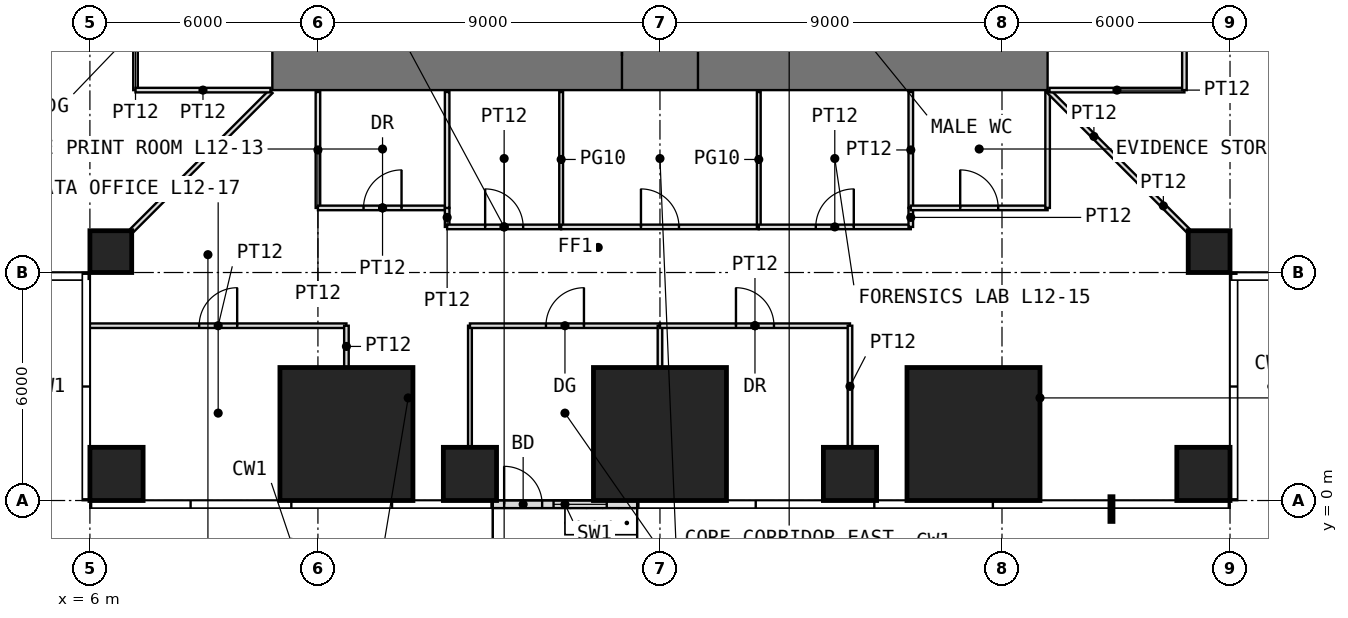
"""IFC4 building model, lengths in metres.
Left out: names, types, materials, properties, quantities, classifications, styles, units other than length and angle.
Written with IfcOpenShell. Run it as: python <this file> out.ifc"""

import sys

from ifc_helpers import new_model, si_unit, direction, frame, frame_2d, origin, origin_2d, place, context, subcontext, project, spatial, rectangle, extrude, element, fill, save


model = new_model("IFC4")
c1 = context("Model", 3, precision=1e-05, world=origin(), true_north=direction((0.0, 1.0)))
c2 = subcontext(c1, "Body", "Model", "MODEL_VIEW")
j1 = project(units=[si_unit("LENGTHUNIT", "METRE"), si_unit("PLANEANGLEUNIT", "RADIAN")], contexts=[c1])
p1 = place(None, origin())
s1 = spatial("IfcSite", under=j1, at=p1, CompositionType="ELEMENT")
p2 = place(p1, origin())
s2 = spatial("IfcBuilding", under=s1, at=p2, CompositionType="ELEMENT")
p3 = place(p2, frame((0.0, 0.0, 54.5)))
s3 = spatial("IfcBuildingStorey", under=s2, at=p3, CompositionType="ELEMENT", Elevation=54.5)
p4 = place(p3, frame((6.7, 0.7, 0.0), z_axis=(0.0, 0.0, 1.0), x_axis=(1.0, 0.0, 0.0)))
e1 = element("IfcColumn", 1, at=p4, inside=s3, PredefinedType="COLUMN", context=c2, shape_type="SweptSolid", body=[
    extrude(rectangle(XDim=1.4, YDim=1.4, at=origin_2d()), origin(), (0.0, 0.0, 1.0), 4.0),
])
p5 = place(p3, frame((12.75, 1.75, 0.0), z_axis=(0.0, 0.0, 1.0), x_axis=(1.0, 0.0, 0.0)))
e2 = element("IfcColumn", 2, at=p5, inside=s3, PredefinedType="COLUMN", context=c2, shape_type="SweptSolid", body=[
    extrude(rectangle(XDim=3.5, YDim=3.5, at=origin_2d()), origin(), (0.0, 0.0, 1.0), 4.0),
])
p6 = place(p3, frame((16.0, 0.7, 0.0), z_axis=(0.0, 0.0, 1.0), x_axis=(1.0, 0.0, 0.0)))
e3 = element("IfcColumn", 3, at=p6, inside=s3, PredefinedType="COLUMN", context=c2, shape_type="SweptSolid", body=[
    extrude(rectangle(XDim=1.4, YDim=1.4, at=origin_2d()), origin(), (0.0, 0.0, 1.0), 4.0),
])
p7 = place(p3, frame((21.0, 1.75, 0.0), z_axis=(0.0, 0.0, 1.0), x_axis=(1.0, 0.0, 0.0)))
e4 = element("IfcColumn", 4, at=p7, inside=s3, PredefinedType="COLUMN", context=c2, shape_type="SweptSolid", body=[
    extrude(rectangle(XDim=3.5, YDim=3.5, at=origin_2d()), origin(), (0.0, 0.0, 1.0), 4.0),
])
p8 = place(p3, frame((26.0, 0.7, 0.0), z_axis=(0.0, 0.0, 1.0), x_axis=(1.0, 0.0, 0.0)))
e5 = element("IfcColumn", 5, at=p8, inside=s3, PredefinedType="COLUMN", context=c2, shape_type="SweptSolid", body=[
    extrude(rectangle(XDim=1.4, YDim=1.4, at=origin_2d()), origin(), (0.0, 0.0, 1.0), 4.0),
])
p9 = place(p3, frame((29.25, 1.75, 0.0), z_axis=(0.0, 0.0, 1.0), x_axis=(1.0, 0.0, 0.0)))
e6 = element("IfcColumn", 6, at=p9, inside=s3, PredefinedType="COLUMN", context=c2, shape_type="SweptSolid", body=[
    extrude(rectangle(XDim=3.5, YDim=3.5, at=origin_2d()), origin(), (0.0, 0.0, 1.0), 4.0),
])
p10 = place(p3, frame((35.3, 0.7, 0.0), z_axis=(0.0, 0.0, 1.0), x_axis=(1.0, 0.0, 0.0)))
e7 = element("IfcColumn", 7, at=p10, inside=s3, PredefinedType="COLUMN", context=c2, shape_type="SweptSolid", body=[
    extrude(rectangle(XDim=1.4, YDim=1.4, at=origin_2d()), origin(), (0.0, 0.0, 1.0), 4.0),
])
for number, where, z_axis, x_axis in (
    (8, (6.55, 6.55, 0.0), (0.0, 0.0, 1.0), (1.0, 0.0, 0.0)),
    (9, (35.45, 6.55, 0.0), (0.0, 0.0, 1.0), (1.0, 0.0, 0.0)),
):
    element("IfcColumn", number, at=place(p3, frame(where, z_axis=z_axis, x_axis=x_axis)), inside=s3, PredefinedType="COLUMN", context=c2, shape_type="SweptSolid", body=[
        extrude(rectangle(XDim=1.1, YDim=1.1, at=origin_2d()), origin(), (0.0, 0.0, 1.0), 4.0),
    ])
p11 = place(p3, frame((16.6, -0.1, 0.0), z_axis=(0.0, 0.0, 1.0), x_axis=(1.0, 0.0, 0.0)))
e10 = element("IfcWall", 10, at=p11, inside=s3, PredefinedType="USERDEFINED", context=c2, shape_type="SweptSolid", body=[
    extrude(rectangle(XDim=3.8, YDim=0.2, at=frame_2d((1.9, 0.0))), origin(), (0.0, 0.0, 1.0), 3.75),
])
p12 = place(p11, frame((0.3, 0.0, 0.0)))
e11 = element("IfcOpeningElement", 11, at=p12, cuts=e10, PredefinedType="OPENING", context=c2, shape_type="SweptSolid", body=[
    extrude(rectangle(XDim=1.0, YDim=2.4, at=frame_2d((0.5, 1.2))), frame((0.0, 0.11, 0.0), z_axis=(0.0, -1.0, 0.0), x_axis=(1.0, 0.0, 0.0)), (0.0, 0.0, 1.0), 0.22),
])
p13 = place(p11, frame((1.6, 0.0, 0.3)))
e12 = element("IfcOpeningElement", 12, at=p13, cuts=e10, PredefinedType="OPENING", context=c2, shape_type="SweptSolid", body=[
    extrude(rectangle(XDim=1.4, YDim=2.7, at=frame_2d((0.7, 1.35))), frame((0.0, 0.11, 0.0), z_axis=(0.0, -1.0, 0.0), x_axis=(1.0, 0.0, 0.0)), (0.0, 0.0, 1.0), 0.22),
])
p14 = place(p3, frame((10.8, 11.7, -0.05), z_axis=(0.0, 0.0, 1.0), x_axis=(1.0, 0.0, 0.0)))
e13 = element("IfcWall", 13, at=p14, inside=s3, PredefinedType="SHEAR", context=c2, shape_type="SweptSolid", body=[
    extrude(rectangle(XDim=20.4, YDim=1.8, at=frame_2d((10.2, 0.0))), origin(), (0.0, 0.0, 1.0), 4.0),
])
p15 = place(p14, frame((9.2, 0.0, 0.05)))
e14 = element("IfcOpeningElement", 14, at=p15, cuts=e13, PredefinedType="OPENING", context=c2, shape_type="SweptSolid", body=[
    extrude(rectangle(XDim=2.0, YDim=2.2, at=frame_2d((1.0, 1.1))), frame((0.0, 0.91, 0.0), z_axis=(0.0, -1.0, 0.0), x_axis=(1.0, 0.0, 0.0)), (0.0, 0.0, 1.0), 1.82),
])
p16 = place(p3, frame((6.0, 4.6, 0.0), z_axis=(0.0, 0.0, 1.0), x_axis=(1.0, 0.0, 0.0)))
e15 = element("IfcWall", 15, at=p16, inside=s3, PredefinedType="PARTITIONING", context=c2, shape_type="SweptSolid", body=[
    extrude(rectangle(XDim=6.75, YDim=0.12, at=frame_2d((3.375, 0.0))), origin(), (0.0, 0.0, 1.0), 3.75),
])
p17 = place(p16, frame((2.875, 0.0, 0.0)))
e16 = element("IfcOpeningElement", 16, at=p17, cuts=e15, PredefinedType="OPENING", context=c2, shape_type="SweptSolid", body=[
    extrude(rectangle(XDim=1.0, YDim=2.2, at=frame_2d((0.5, 1.1))), frame((0.0, 0.07, 0.0), z_axis=(0.0, -1.0, 0.0), x_axis=(1.0, 0.0, 0.0)), (0.0, 0.0, 1.0), 0.14),
])
p18 = place(p3, frame((7.11, 7.11, 0.0), z_axis=(0.0, 0.0, 1.0), x_axis=(0.707106781187, 0.707106781187, 0.0)))
e17 = element("IfcWall", 17, at=p18, inside=s3, PredefinedType="PARTITIONING", context=c2, shape_type="SweptSolid", body=[
    extrude(rectangle(XDim=5.168, YDim=0.12, at=frame_2d((2.584, 0.0))), origin(), (0.0, 0.0, 1.0), 3.75),
])
p19 = place(p3, frame((7.2, 10.8, 0.0), z_axis=(0.0, 0.0, 1.0), x_axis=(0.0, 1.0, 0.0)))
e18 = element("IfcWall", 18, at=p19, inside=s3, PredefinedType="PARTITIONING", context=c2, shape_type="SweptSolid", body=[
    extrude(rectangle(XDim=3.2, YDim=0.12, at=frame_2d((1.6, 0.0))), origin(), (0.0, 0.0, 1.0), 3.75),
])
p20 = place(p19, frame((1.1, 0.0, 0.0)))
e19 = element("IfcOpeningElement", 19, at=p20, cuts=e18, PredefinedType="OPENING", context=c2, shape_type="SweptSolid", body=[
    extrude(rectangle(XDim=1.0, YDim=2.4, at=frame_2d((0.5, 1.2))), frame((0.0, 0.07, 0.0), z_axis=(0.0, -1.0, 0.0), x_axis=(1.0, 0.0, 0.0)), (0.0, 0.0, 1.0), 0.14),
])
p21 = place(p3, frame((7.2, 10.8, 0.0), z_axis=(0.0, 0.0, 1.0), x_axis=(1.0, 0.0, 0.0)))
e20 = element("IfcWall", 20, at=p21, inside=s3, PredefinedType="PARTITIONING", context=c2, shape_type="SweptSolid", body=[
    extrude(rectangle(XDim=3.55, YDim=0.12, at=frame_2d((1.775, 0.0))), origin(), (0.0, 0.0, 1.0), 3.75),
])
p22 = place(p3, frame((12.0, 7.7, 0.0), z_axis=(0.0, 0.0, 1.0), x_axis=(0.0, 1.0, 0.0)))
e21 = element("IfcWall", 21, at=p22, inside=s3, PredefinedType="PARTITIONING", context=c2, shape_type="SweptSolid", body=[
    extrude(rectangle(XDim=3.05, YDim=0.12, at=frame_2d((1.525, 0.0))), origin(), (0.0, 0.0, 1.0), 3.75),
])
p23 = place(p3, frame((12.0, 7.7, 0.0), z_axis=(0.0, 0.0, 1.0), x_axis=(1.0, 0.0, 0.0)))
e22 = element("IfcWall", 22, at=p23, inside=s3, PredefinedType="PARTITIONING", context=c2, shape_type="SweptSolid", body=[
    extrude(rectangle(XDim=3.4, YDim=0.12, at=frame_2d((1.7, 0.0))), origin(), (0.0, 0.0, 1.0), 3.75),
])
p24 = place(p23, frame((1.2, 0.0, 0.0)))
e23 = element("IfcOpeningElement", 23, at=p24, cuts=e22, PredefinedType="OPENING", context=c2, shape_type="SweptSolid", body=[
    extrude(rectangle(XDim=1.0, YDim=2.2, at=frame_2d((0.5, 1.1))), frame((0.0, 0.07, 0.0), z_axis=(0.0, -1.0, 0.0), x_axis=(1.0, 0.0, 0.0)), (0.0, 0.0, 1.0), 0.14),
])
p25 = place(p3, frame((12.75, 3.51, 0.0), z_axis=(0.0, 0.0, 1.0), x_axis=(0.0, 1.0, 0.0)))
e24 = element("IfcWall", 24, at=p25, inside=s3, PredefinedType="PARTITIONING", context=c2, shape_type="SweptSolid", body=[
    extrude(rectangle(XDim=1.09, YDim=0.12, at=frame_2d((0.545, 0.0))), origin(), (0.0, 0.0, 1.0), 3.75),
])
p26 = place(p3, frame((15.4, 7.2, 0.0), z_axis=(0.0, 0.0, 1.0), x_axis=(0.0, 1.0, 0.0)))
e25 = element("IfcWall", 25, at=p26, inside=s3, PredefinedType="PARTITIONING", context=c2, shape_type="SweptSolid", body=[
    extrude(rectangle(XDim=0.5, YDim=0.12, at=frame_2d((0.25, 0.0))), origin(), (0.0, 0.0, 1.0), 3.75),
])
p27 = place(p3, frame((15.4, 7.2, 0.0), z_axis=(0.0, 0.0, 1.0), x_axis=(1.0, 0.0, 0.0)))
e26 = element("IfcWall", 26, at=p27, inside=s3, PredefinedType="PARTITIONING", context=c2, shape_type="SweptSolid", body=[
    extrude(rectangle(XDim=3.0, YDim=0.12, at=frame_2d((1.5, 0.0))), origin(), (0.0, 0.0, 1.0), 3.75),
])
p28 = place(p27, frame((1.0, 0.0, 0.0)))
e27 = element("IfcOpeningElement", 27, at=p28, cuts=e26, PredefinedType="OPENING", context=c2, shape_type="SweptSolid", body=[
    extrude(rectangle(XDim=1.0, YDim=2.4, at=frame_2d((0.5, 1.2))), frame((0.0, 0.07, 0.0), z_axis=(0.0, -1.0, 0.0), x_axis=(1.0, 0.0, 0.0)), (0.0, 0.0, 1.0), 0.14),
])
p29 = place(p3, frame((15.4, 7.7, 0.0), z_axis=(0.0, 0.0, 1.0), x_axis=(0.0, 1.0, 0.0)))
e28 = element("IfcWall", 28, at=p29, inside=s3, PredefinedType="PARTITIONING", context=c2, shape_type="SweptSolid", body=[
    extrude(rectangle(XDim=3.05, YDim=0.12, at=frame_2d((1.525, 0.0))), origin(), (0.0, 0.0, 1.0), 3.75),
])
p30 = place(p3, frame((16.0, 1.41, 0.0), z_axis=(0.0, 0.0, 1.0), x_axis=(0.0, 1.0, 0.0)))
e29 = element("IfcWall", 29, at=p30, inside=s3, PredefinedType="PARTITIONING", context=c2, shape_type="SweptSolid", body=[
    extrude(rectangle(XDim=3.19, YDim=0.1, at=frame_2d((1.595, 0.0))), origin(), (0.0, 0.0, 1.0), 3.75),
])
p31 = place(p3, frame((16.0, 4.6, 0.0), z_axis=(0.0, 0.0, 1.0), x_axis=(1.0, 0.0, 0.0)))
e30 = element("IfcWall", 30, at=p31, inside=s3, PredefinedType="PARTITIONING", context=c2, shape_type="SweptSolid", body=[
    extrude(rectangle(XDim=5.0, YDim=0.12, at=frame_2d((2.5, 0.0))), origin(), (0.0, 0.0, 1.0), 3.75),
])
p32 = place(p31, frame((2.0, 0.0, 0.0)))
e31 = element("IfcOpeningElement", 31, at=p32, cuts=e30, PredefinedType="OPENING", context=c2, shape_type="SweptSolid", body=[
    extrude(rectangle(XDim=1.0, YDim=2.4, at=frame_2d((0.5, 1.2))), frame((0.0, 0.07, 0.0), z_axis=(0.0, -1.0, 0.0), x_axis=(1.0, 0.0, 0.0)), (0.0, 0.0, 1.0), 0.14),
])
p33 = place(p3, frame((18.4, 7.2, 0.0), z_axis=(0.0, 0.0, 1.0), x_axis=(0.0, 1.0, 0.0)))
e32 = element("IfcWall", 32, at=p33, inside=s3, PredefinedType="PARTITIONING", context=c2, shape_type="SweptSolid", body=[
    extrude(rectangle(XDim=3.55, YDim=0.1, at=frame_2d((1.775, 0.0))), origin(), (0.0, 0.0, 1.0), 3.75),
])
p34 = place(p3, frame((18.4, 7.2, 0.0), z_axis=(0.0, 0.0, 1.0), x_axis=(1.0, 0.0, 0.0)))
e33 = element("IfcWall", 33, at=p34, inside=s3, PredefinedType="PARTITIONING", context=c2, shape_type="SweptSolid", body=[
    extrude(rectangle(XDim=5.2, YDim=0.12, at=frame_2d((2.6, 0.0))), origin(), (0.0, 0.0, 1.0), 3.75),
])
p35 = place(p34, frame((2.1, 0.0, 0.0)))
e34 = element("IfcOpeningElement", 34, at=p35, cuts=e33, PredefinedType="OPENING", context=c2, shape_type="SweptSolid", body=[
    extrude(rectangle(XDim=1.0, YDim=2.4, at=frame_2d((0.5, 1.2))), frame((0.0, 0.07, 0.0), z_axis=(0.0, -1.0, 0.0), x_axis=(1.0, 0.0, 0.0)), (0.0, 0.0, 1.0), 0.14),
])
p36 = place(p3, frame((21.0, 3.51, 0.0), z_axis=(0.0, 0.0, 1.0), x_axis=(0.0, 1.0, 0.0)))
e35 = element("IfcWall", 35, at=p36, inside=s3, PredefinedType="PARTITIONING", context=c2, shape_type="SweptSolid", body=[
    extrude(rectangle(XDim=1.09, YDim=0.12, at=frame_2d((0.545, 0.0))), origin(), (0.0, 0.0, 1.0), 3.75),
])
p37 = place(p3, frame((21.0, 4.6, 0.0), z_axis=(0.0, 0.0, 1.0), x_axis=(1.0, 0.0, 0.0)))
e36 = element("IfcWall", 36, at=p37, inside=s3, PredefinedType="PARTITIONING", context=c2, shape_type="SweptSolid", body=[
    extrude(rectangle(XDim=5.0, YDim=0.12, at=frame_2d((2.5, 0.0))), origin(), (0.0, 0.0, 1.0), 3.75),
])
p38 = place(p37, frame((2.0, 0.0, 0.0)))
e37 = element("IfcOpeningElement", 37, at=p38, cuts=e36, PredefinedType="OPENING", context=c2, shape_type="SweptSolid", body=[
    extrude(rectangle(XDim=1.0, YDim=2.2, at=frame_2d((0.5, 1.1))), frame((0.0, 0.07, 0.0), z_axis=(0.0, -1.0, 0.0), x_axis=(1.0, 0.0, 0.0)), (0.0, 0.0, 1.0), 0.14),
])
p39 = place(p3, frame((23.6, 7.2, 0.0), z_axis=(0.0, 0.0, 1.0), x_axis=(0.0, 1.0, 0.0)))
e38 = element("IfcWall", 38, at=p39, inside=s3, PredefinedType="PARTITIONING", context=c2, shape_type="SweptSolid", body=[
    extrude(rectangle(XDim=3.55, YDim=0.1, at=frame_2d((1.775, 0.0))), origin(), (0.0, 0.0, 1.0), 3.75),
])
p40 = place(p3, frame((23.6, 7.2, 0.0), z_axis=(0.0, 0.0, 1.0), x_axis=(1.0, 0.0, 0.0)))
e39 = element("IfcWall", 39, at=p40, inside=s3, PredefinedType="PARTITIONING", context=c2, shape_type="SweptSolid", body=[
    extrude(rectangle(XDim=4.0, YDim=0.12, at=frame_2d((2.0, 0.0))), origin(), (0.0, 0.0, 1.0), 3.75),
])
p41 = place(p40, frame((1.5, 0.0, 0.0)))
e40 = element("IfcOpeningElement", 40, at=p41, cuts=e39, PredefinedType="OPENING", context=c2, shape_type="SweptSolid", body=[
    extrude(rectangle(XDim=1.0, YDim=2.4, at=frame_2d((0.5, 1.2))), frame((0.0, 0.07, 0.0), z_axis=(0.0, -1.0, 0.0), x_axis=(1.0, 0.0, 0.0)), (0.0, 0.0, 1.0), 0.14),
])
p42 = place(p3, frame((26.0, 1.41, 0.0), z_axis=(0.0, 0.0, 1.0), x_axis=(0.0, 1.0, 0.0)))
e41 = element("IfcWall", 41, at=p42, inside=s3, PredefinedType="PARTITIONING", context=c2, shape_type="SweptSolid", body=[
    extrude(rectangle(XDim=3.19, YDim=0.12, at=frame_2d((1.595, 0.0))), origin(), (0.0, 0.0, 1.0), 3.75),
])
p43 = place(p3, frame((27.6, 7.2, 0.0), z_axis=(0.0, 0.0, 1.0), x_axis=(0.0, 1.0, 0.0)))
e42 = element("IfcWall", 42, at=p43, inside=s3, PredefinedType="PARTITIONING", context=c2, shape_type="SweptSolid", body=[
    extrude(rectangle(XDim=0.5, YDim=0.12, at=frame_2d((0.25, 0.0))), origin(), (0.0, 0.0, 1.0), 3.75),
])
p44 = place(p3, frame((27.6, 7.7, 0.0), z_axis=(0.0, 0.0, 1.0), x_axis=(0.0, 1.0, 0.0)))
e43 = element("IfcWall", 43, at=p44, inside=s3, PredefinedType="PARTITIONING", context=c2, shape_type="SweptSolid", body=[
    extrude(rectangle(XDim=3.05, YDim=0.12, at=frame_2d((1.525, 0.0))), origin(), (0.0, 0.0, 1.0), 3.75),
])
p45 = place(p3, frame((27.6, 7.7, 0.0), z_axis=(0.0, 0.0, 1.0), x_axis=(1.0, 0.0, 0.0)))
e44 = element("IfcWall", 44, at=p45, inside=s3, PredefinedType="PARTITIONING", context=c2, shape_type="SweptSolid", body=[
    extrude(rectangle(XDim=3.6, YDim=0.12, at=frame_2d((1.8, 0.0))), origin(), (0.0, 0.0, 1.0), 3.75),
])
p46 = place(p45, frame((1.3, 0.0, 0.0)))
e45 = element("IfcOpeningElement", 45, at=p46, cuts=e44, PredefinedType="OPENING", context=c2, shape_type="SweptSolid", body=[
    extrude(rectangle(XDim=1.0, YDim=2.2, at=frame_2d((0.5, 1.1))), frame((0.0, 0.07, 0.0), z_axis=(0.0, -1.0, 0.0), x_axis=(1.0, 0.0, 0.0)), (0.0, 0.0, 1.0), 0.14),
])
p47 = place(p3, frame((31.2, 7.7, 0.0), z_axis=(0.0, 0.0, 1.0), x_axis=(0.0, 1.0, 0.0)))
e46 = element("IfcWall", 46, at=p47, inside=s3, PredefinedType="PARTITIONING", context=c2, shape_type="SweptSolid", body=[
    extrude(rectangle(XDim=3.05, YDim=0.12, at=frame_2d((1.525, 0.0))), origin(), (0.0, 0.0, 1.0), 3.75),
])
p48 = place(p3, frame((31.235, 10.765, 0.0), z_axis=(0.0, 0.0, 1.0), x_axis=(0.707106781187, -0.707106781187, 0.0)))
e47 = element("IfcWall", 47, at=p48, inside=s3, PredefinedType="PARTITIONING", context=c2, shape_type="SweptSolid", body=[
    extrude(rectangle(XDim=3.346, YDim=0.12, at=frame_2d((1.673, 0.0))), origin(), (0.0, 0.0, 1.0), 3.75),
])
p49 = place(p3, frame((31.25, 10.8, 0.0), z_axis=(0.0, 0.0, 1.0), x_axis=(1.0, 0.0, 0.0)))
e48 = element("IfcWall", 48, at=p49, inside=s3, PredefinedType="PARTITIONING", context=c2, shape_type="SweptSolid", body=[
    extrude(rectangle(XDim=3.55, YDim=0.12, at=frame_2d((1.775, 0.0))), origin(), (0.0, 0.0, 1.0), 3.75),
])
p50 = place(p3, frame((33.602, 8.398, 0.0), z_axis=(0.0, 0.0, 1.0), x_axis=(0.707106781187, -0.707106781187, 0.0)))
e49 = element("IfcWall", 49, at=p50, inside=s3, PredefinedType="PARTITIONING", context=c2, shape_type="SweptSolid", body=[
    extrude(rectangle(XDim=1.822, YDim=0.12, at=frame_2d((0.911, 0.0))), origin(), (0.0, 0.0, 1.0), 3.75),
])
p51 = place(p3, frame((34.8, 10.8, 0.0), z_axis=(0.0, 0.0, 1.0), x_axis=(0.0, 1.0, 0.0)))
e50 = element("IfcWall", 50, at=p51, inside=s3, PredefinedType="PARTITIONING", context=c2, shape_type="SweptSolid", body=[
    extrude(rectangle(XDim=3.3, YDim=0.12, at=frame_2d((1.65, 0.0))), origin(), (0.0, 0.0, 1.0), 3.75),
])
p52 = place(p51, frame((1.15, 0.0, 0.0)))
e51 = element("IfcOpeningElement", 51, at=p52, cuts=e50, PredefinedType="OPENING", context=c2, shape_type="SweptSolid", body=[
    extrude(rectangle(XDim=1.0, YDim=2.2, at=frame_2d((0.5, 1.1))), frame((0.0, 0.07, 0.0), z_axis=(0.0, -1.0, 0.0), x_axis=(1.0, 0.0, 0.0)), (0.0, 0.0, 1.0), 0.14),
])
p53 = place(p12, origin())
e52 = element("IfcDoor", 52, at=p53, inside=s3, OperationType="SINGLE_SWING_LEFT", PredefinedType="DOOR", context=c2, shape_type="SweptSolid", body=[
    extrude(rectangle(XDim=1.0, YDim=2.4, at=frame_2d((0.5, 1.2))), frame((0.0, 0.025, 0.0), z_axis=(0.0, -1.0, 0.0), x_axis=(1.0, 0.0, 0.0)), (0.0, 0.0, 1.0), 0.05),
])
fill(e11, e52)
p54 = place(p13, origin())
e53 = element("IfcWindow", 53, at=p54, inside=s3, PartitioningType="SINGLE_PANEL", PredefinedType="WINDOW", context=c2, shape_type="SweptSolid", body=[
    extrude(rectangle(XDim=1.4, YDim=2.7, at=frame_2d((0.7, 1.35))), frame((0.0, 0.03, 0.0), z_axis=(0.0, -1.0, 0.0), x_axis=(1.0, 0.0, 0.0)), (0.0, 0.0, 1.0), 0.06),
])
fill(e12, e53)
p55 = place(p15, origin())
e54 = element("IfcDoor", 54, at=p55, inside=s3, OperationType="DOUBLE_DOOR_SINGLE_SWING", PredefinedType="DOOR", context=c2, shape_type="SweptSolid", body=[
    extrude(rectangle(XDim=2.0, YDim=2.2, at=frame_2d((1.0, 1.1))), frame((0.0, 0.025, 0.0), z_axis=(0.0, -1.0, 0.0), x_axis=(1.0, 0.0, 0.0)), (0.0, 0.0, 1.0), 0.05),
])
fill(e14, e54)
p56 = place(p24, origin())
e55 = element("IfcDoor", 55, at=p56, inside=s3, OperationType="SINGLE_SWING_RIGHT", PredefinedType="DOOR", context=c2, shape_type="SweptSolid", body=[
    extrude(rectangle(XDim=1.0, YDim=2.2, at=frame_2d((0.5, 1.1))), frame((0.0, 0.025, 0.0), z_axis=(0.0, -1.0, 0.0), x_axis=(1.0, 0.0, 0.0)), (0.0, 0.0, 1.0), 0.05),
])
fill(e23, e55)
p57 = place(p28, origin())
e56 = element("IfcDoor", 56, at=p57, inside=s3, OperationType="SINGLE_SWING_LEFT", PredefinedType="DOOR", context=c2, shape_type="SweptSolid", body=[
    extrude(rectangle(XDim=1.0, YDim=2.4, at=frame_2d((0.5, 1.2))), frame((0.0, 0.025, 0.0), z_axis=(0.0, -1.0, 0.0), x_axis=(1.0, 0.0, 0.0)), (0.0, 0.0, 1.0), 0.05),
])
fill(e27, e56)
p58 = place(p41, origin())
e57 = element("IfcDoor", 57, at=p58, inside=s3, OperationType="SINGLE_SWING_RIGHT", PredefinedType="DOOR", context=c2, shape_type="SweptSolid", body=[
    extrude(rectangle(XDim=1.0, YDim=2.4, at=frame_2d((0.5, 1.2))), frame((0.0, 0.025, 0.0), z_axis=(0.0, -1.0, 0.0), x_axis=(1.0, 0.0, 0.0)), (0.0, 0.0, 1.0), 0.05),
])
fill(e40, e57)
p59 = place(p46, origin())
e58 = element("IfcDoor", 58, at=p59, inside=s3, OperationType="SINGLE_SWING_LEFT", PredefinedType="DOOR", context=c2, shape_type="SweptSolid", body=[
    extrude(rectangle(XDim=1.0, YDim=2.2, at=frame_2d((0.5, 1.1))), frame((0.0, 0.025, 0.0), z_axis=(0.0, -1.0, 0.0), x_axis=(1.0, 0.0, 0.0)), (0.0, 0.0, 1.0), 0.05),
])
fill(e45, e58)
p60 = place(p17, origin())
e59 = element("IfcDoor", 59, at=p60, inside=s3, OperationType="SINGLE_SWING_RIGHT", PredefinedType="DOOR", context=c2, shape_type="SweptSolid", body=[
    extrude(rectangle(XDim=1.0, YDim=2.2, at=frame_2d((0.5, 1.1))), frame((0.0, 0.025, 0.0), z_axis=(0.0, -1.0, 0.0), x_axis=(1.0, 0.0, 0.0)), (0.0, 0.0, 1.0), 0.05),
])
fill(e16, e59)
p61 = place(p32, origin())
e60 = element("IfcDoor", 60, at=p61, inside=s3, OperationType="SINGLE_SWING_RIGHT", PredefinedType="DOOR", context=c2, shape_type="SweptSolid", body=[
    extrude(rectangle(XDim=1.0, YDim=2.4, at=frame_2d((0.5, 1.2))), frame((0.0, 0.025, 0.0), z_axis=(0.0, -1.0, 0.0), x_axis=(1.0, 0.0, 0.0)), (0.0, 0.0, 1.0), 0.05),
])
fill(e31, e60)
p62 = place(p38, origin())
e61 = element("IfcDoor", 61, at=p62, inside=s3, OperationType="SINGLE_SWING_LEFT", PredefinedType="DOOR", context=c2, shape_type="SweptSolid", body=[
    extrude(rectangle(XDim=1.0, YDim=2.2, at=frame_2d((0.5, 1.1))), frame((0.0, 0.025, 0.0), z_axis=(0.0, -1.0, 0.0), x_axis=(1.0, 0.0, 0.0)), (0.0, 0.0, 1.0), 0.05),
])
fill(e37, e61)
p63 = place(p35, origin())
e62 = element("IfcDoor", 62, at=p63, inside=s3, OperationType="SINGLE_SWING_LEFT", PredefinedType="DOOR", context=c2, shape_type="SweptSolid", body=[
    extrude(rectangle(XDim=1.0, YDim=2.4, at=frame_2d((0.5, 1.2))), frame((0.0, 0.025, 0.0), z_axis=(0.0, -1.0, 0.0), x_axis=(1.0, 0.0, 0.0)), (0.0, 0.0, 1.0), 0.05),
])
fill(e34, e62)
save(model, sys.argv[1])
